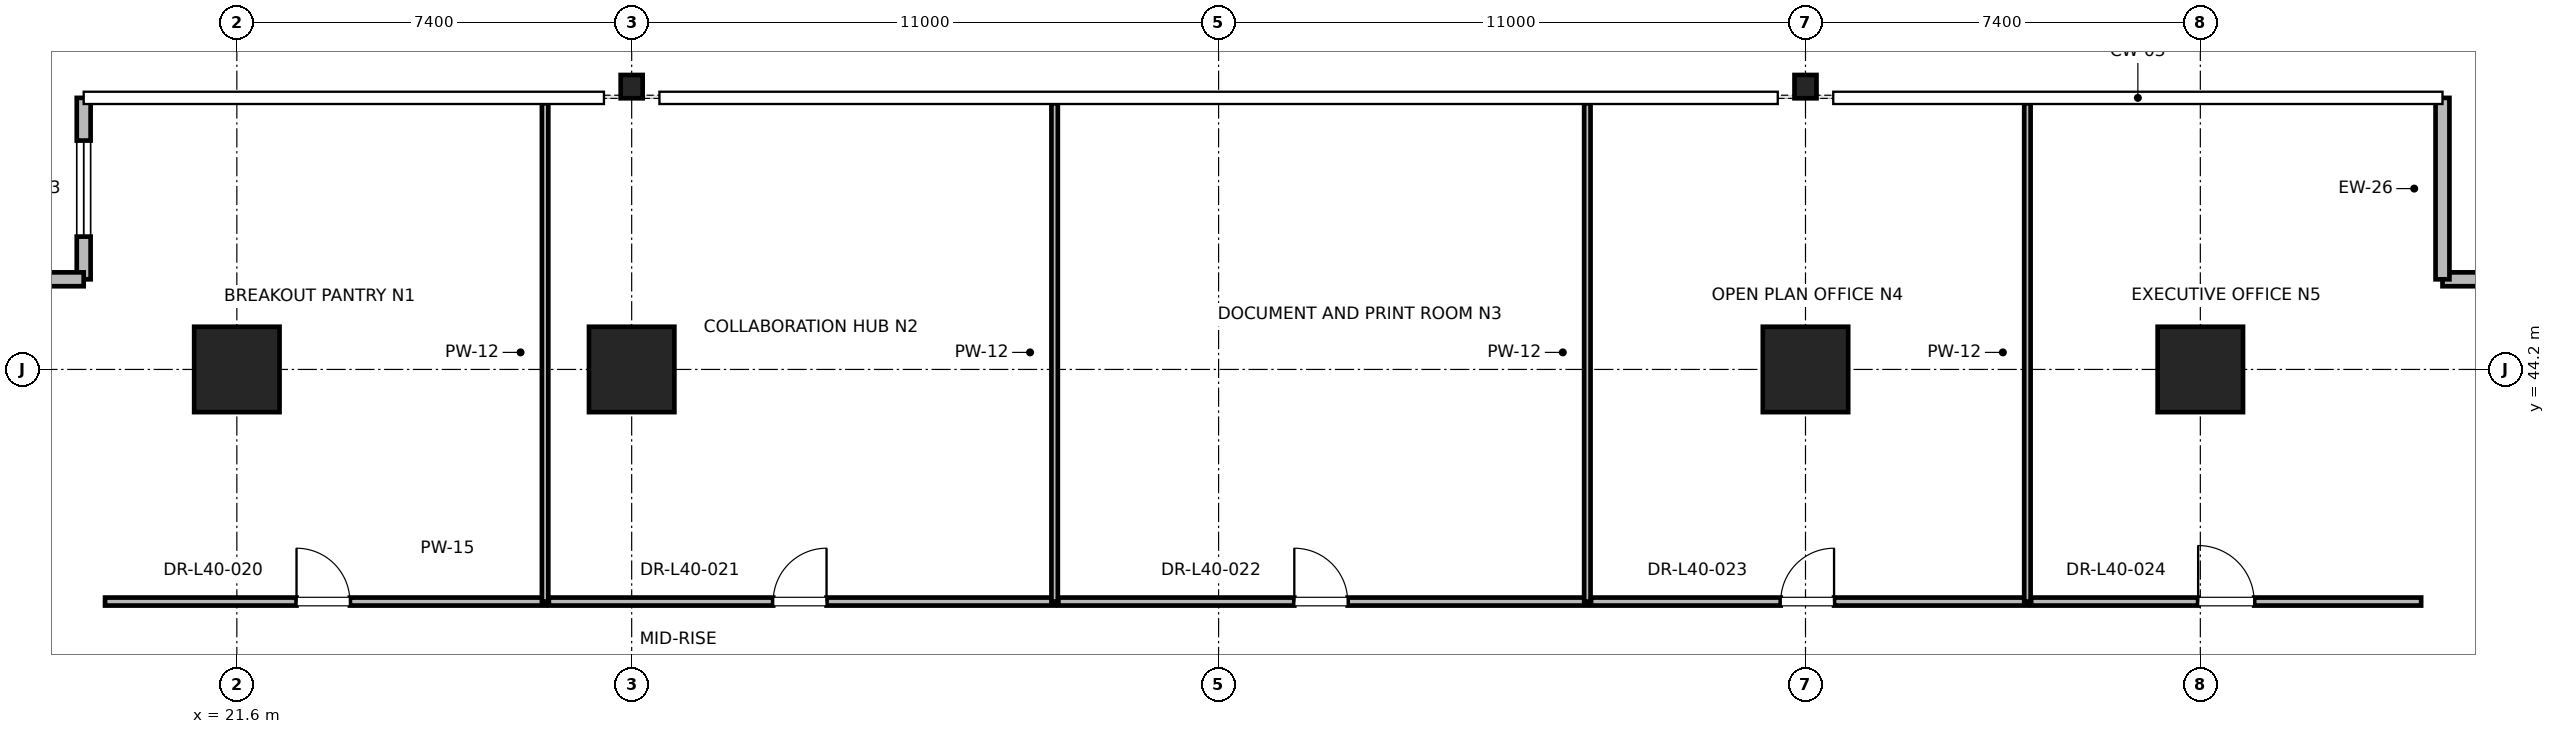
"""IFC4 building model, lengths in metres.
Left out: names, types, materials, properties, quantities, classifications, styles, units other than length and angle.
Written with IfcOpenShell. Run it as: python <this file> out.ifc"""

import sys

from ifc_helpers import new_model, si_unit, direction, frame, frame_2d, origin, origin_2d, place, context, subcontext, project, spatial, rectangle, i_section, extrude, element, fill, save


model = new_model("IFC4")
c1 = context("Model", 3, precision=1e-05, world=origin(), true_north=direction((0.0, 1.0)))
c2 = subcontext(c1, "Body", "Model", "MODEL_VIEW")
j1 = project(units=[si_unit("LENGTHUNIT", "METRE"), si_unit("PLANEANGLEUNIT", "RADIAN")], contexts=[c1])
p1 = place(None, origin())
s1 = spatial("IfcSite", under=j1, at=p1, CompositionType="ELEMENT")
p2 = place(p1, origin())
s2 = spatial("IfcBuilding", under=s1, at=p2, CompositionType="ELEMENT")
p3 = place(p2, frame((0.0, 0.0, 172.4)))
s3 = spatial("IfcBuildingStorey", under=s2, at=p3, CompositionType="ELEMENT", Elevation=172.4)
for number, where, z_axis, x_axis in (
    (1, (29.0, 44.2, 0.0), (0.0, 0.0, 1.0), (1.0, 0.0, 0.0)),
    (2, (51.0, 44.2, 0.0), (0.0, 0.0, 1.0), (1.0, 0.0, 0.0)),
    (3, (21.6, 44.2, 0.0), (0.0, 0.0, 1.0), (1.0, 0.0, 0.0)),
    (4, (58.4, 44.2, 0.0), (0.0, 0.0, 1.0), (1.0, 0.0, 0.0)),
):
    element("IfcColumn", number, at=place(p3, frame(where, z_axis=z_axis, x_axis=x_axis)), inside=s3, PredefinedType="COLUMN", context=c2, shape_type="SweptSolid", body=[
        extrude(rectangle(XDim=1.6, YDim=1.6, at=origin_2d()), origin(), (0.0, 0.0, 1.0), 4.0),
    ])
for number, where, z_axis, x_axis in (
    (5, (29.0, 49.5, 0.0), (0.0, 0.0, 1.0), (1.0, 0.0, 0.0)),
    (6, (51.0, 49.5, 0.0), (0.0, 0.0, 1.0), (1.0, 0.0, 0.0)),
):
    element("IfcColumn", number, at=place(p3, frame(where, z_axis=z_axis, x_axis=x_axis)), inside=s3, PredefinedType="COLUMN", context=c2, shape_type="SweptSolid", body=[
        extrude(i_section(OverallWidth=0.412, OverallDepth=0.437, WebThickness=0.036, FlangeThickness=0.058, FilletRadius=0.015, at=origin_2d()), origin(), (0.0, 0.0, 1.0), 4.0),
    ])
p4 = place(p3, frame((66.739, 45.889, 0.0), z_axis=(0.0, 0.0, 1.0), x_axis=(-1.0, 0.0, 0.0)))
e7 = element("IfcWall", 7, at=p4, inside=s3, PredefinedType="PARAPET", context=c2, shape_type="SweptSolid", body=[
    extrude(rectangle(XDim=3.8, YDim=0.26, at=frame_2d((1.9, 0.0))), origin(), (0.0, 0.0, 1.0), 3.775),
])
p5 = place(p4, frame((1.0, 0.0, 0.85)))
e8 = element("IfcOpeningElement", 8, at=p5, cuts=e7, PredefinedType="OPENING", context=c2, shape_type="SweptSolid", body=[
    extrude(rectangle(XDim=1.8, YDim=2.2, at=frame_2d((0.9, 1.1))), frame((0.0, 0.13, 0.0), z_axis=(0.0, -1.0, 0.0), x_axis=(1.0, 0.0, 0.0)), (0.0, 0.0, 1.0), 0.26),
])
p6 = place(p3, frame((62.939, 45.889, 0.0), z_axis=(0.0, 0.0, 1.0), x_axis=(0.0, 1.0, 0.0)))
e9 = element("IfcWall", 9, at=p6, inside=s3, PredefinedType="PARAPET", context=c2, shape_type="SweptSolid", body=[
    extrude(rectangle(XDim=3.4, YDim=0.26, at=frame_2d((1.7, 0.0))), origin(), (0.0, 0.0, 1.0), 3.775),
])
p7 = place(p3, frame((18.729, 49.289, 0.0), z_axis=(0.0, 0.0, 1.0), x_axis=(0.0, -1.0, 0.0)))
e10 = element("IfcWall", 10, at=p7, inside=s3, PredefinedType="PARAPET", context=c2, shape_type="SweptSolid", body=[
    extrude(rectangle(XDim=3.4, YDim=0.26, at=frame_2d((1.7, 0.0))), origin(), (0.0, 0.0, 1.0), 3.775),
])
p8 = place(p7, frame((0.8, 0.0, 0.85)))
e11 = element("IfcOpeningElement", 11, at=p8, cuts=e10, PredefinedType="OPENING", context=c2, shape_type="SweptSolid", body=[
    extrude(rectangle(XDim=1.8, YDim=2.2, at=frame_2d((0.9, 1.1))), frame((0.0, 0.13, 0.0), z_axis=(0.0, -1.0, 0.0), x_axis=(1.0, 0.0, 0.0)), (0.0, 0.0, 1.0), 0.26),
])
p9 = place(p3, frame((18.729, 45.889, 0.0), z_axis=(0.0, 0.0, 1.0), x_axis=(-1.0, 0.0, 0.0)))
e12 = element("IfcWall", 12, at=p9, inside=s3, PredefinedType="PARAPET", context=c2, shape_type="SweptSolid", body=[
    extrude(rectangle(XDim=3.8, YDim=0.26, at=frame_2d((1.9, 0.0))), origin(), (0.0, 0.0, 1.0), 3.775),
])
p10 = place(p3, frame((19.13, 39.85, 0.0), z_axis=(0.0, 0.0, 1.0), x_axis=(1.0, 0.0, 0.0)))
e13 = element("IfcWall", 13, at=p10, inside=s3, PredefinedType="PARTITIONING", context=c2, shape_type="SweptSolid", body=[
    extrude(rectangle(XDim=8.248, YDim=0.15, at=frame_2d((4.124, 0.0))), origin(), (0.0, 0.0, 1.0), 2.85),
])
p11 = place(p10, frame((3.589, 0.0, 0.0)))
e14 = element("IfcOpeningElement", 14, at=p11, cuts=e13, PredefinedType="OPENING", context=c2, shape_type="SweptSolid", body=[
    extrude(rectangle(XDim=1.0, YDim=2.15, at=frame_2d((0.5, 1.075))), frame((0.0, 0.075, 0.0), z_axis=(0.0, -1.0, 0.0), x_axis=(1.0, 0.0, 0.0)), (0.0, 0.0, 1.0), 0.15),
])
p12 = place(p3, frame((27.377, 39.85, 0.0), z_axis=(0.0, 0.0, 1.0), x_axis=(0.0, 1.0, 0.0)))
e15 = element("IfcWall", 15, at=p12, inside=s3, PredefinedType="PARTITIONING", context=c2, shape_type="SweptSolid", body=[
    extrude(rectangle(XDim=9.339, YDim=0.12, at=frame_2d((4.669, 0.0))), origin(), (0.0, 0.0, 1.0), 2.85),
])
p13 = place(p3, frame((27.447, 39.85, 0.0), z_axis=(0.0, 0.0, 1.0), x_axis=(1.0, 0.0, 0.0)))
e16 = element("IfcWall", 16, at=p13, inside=s3, PredefinedType="PARTITIONING", context=c2, shape_type="SweptSolid", body=[
    extrude(rectangle(XDim=9.48, YDim=0.15, at=frame_2d((4.74, 0.0))), origin(), (0.0, 0.0, 1.0), 2.85),
])
p14 = place(p13, frame((4.205, 0.0, 0.0)))
e17 = element("IfcOpeningElement", 17, at=p14, cuts=e16, PredefinedType="OPENING", context=c2, shape_type="SweptSolid", body=[
    extrude(rectangle(XDim=1.0, YDim=2.15, at=frame_2d((0.5, 1.075))), frame((0.0, 0.075, 0.0), z_axis=(0.0, -1.0, 0.0), x_axis=(1.0, 0.0, 0.0)), (0.0, 0.0, 1.0), 0.15),
])
p15 = place(p3, frame((36.927, 39.85, 0.0), z_axis=(0.0, 0.0, 1.0), x_axis=(0.0, 1.0, 0.0)))
e18 = element("IfcWall", 18, at=p15, inside=s3, PredefinedType="PARTITIONING", context=c2, shape_type="SweptSolid", body=[
    extrude(rectangle(XDim=9.339, YDim=0.12, at=frame_2d((4.669, 0.0))), origin(), (0.0, 0.0, 1.0), 2.405),
])
p16 = place(p3, frame((36.997, 39.85, 0.0), z_axis=(0.0, 0.0, 1.0), x_axis=(1.0, 0.0, 0.0)))
e19 = element("IfcWall", 19, at=p16, inside=s3, PredefinedType="PARTITIONING", context=c2, shape_type="SweptSolid", body=[
    extrude(rectangle(XDim=9.914, YDim=0.15, at=frame_2d((4.957, 0.0))), origin(), (0.0, 0.0, 1.0), 2.85),
])
p17 = place(p16, frame((4.422, 0.0, 0.0)))
e20 = element("IfcOpeningElement", 20, at=p17, cuts=e19, PredefinedType="OPENING", context=c2, shape_type="SweptSolid", body=[
    extrude(rectangle(XDim=1.0, YDim=2.15, at=frame_2d((0.5, 1.075))), frame((0.0, 0.075, 0.0), z_axis=(0.0, -1.0, 0.0), x_axis=(1.0, 0.0, 0.0)), (0.0, 0.0, 1.0), 0.15),
])
p18 = place(p3, frame((46.911, 39.85, 0.0), z_axis=(0.0, 0.0, 1.0), x_axis=(0.0, 1.0, 0.0)))
e21 = element("IfcWall", 21, at=p18, inside=s3, PredefinedType="PARTITIONING", context=c2, shape_type="SweptSolid", body=[
    extrude(rectangle(XDim=9.339, YDim=0.12, at=frame_2d((4.669, 0.0))), origin(), (0.0, 0.0, 1.0), 2.405),
])
p19 = place(p3, frame((46.981, 39.85, 0.0), z_axis=(0.0, 0.0, 1.0), x_axis=(1.0, 0.0, 0.0)))
e22 = element("IfcWall", 22, at=p19, inside=s3, PredefinedType="PARTITIONING", context=c2, shape_type="SweptSolid", body=[
    extrude(rectangle(XDim=8.178, YDim=0.15, at=frame_2d((4.089, 0.0))), origin(), (0.0, 0.0, 1.0), 2.85),
])
p20 = place(p19, frame((3.554, 0.0, 0.0)))
e23 = element("IfcOpeningElement", 23, at=p20, cuts=e22, PredefinedType="OPENING", context=c2, shape_type="SweptSolid", body=[
    extrude(rectangle(XDim=1.0, YDim=2.15, at=frame_2d((0.5, 1.075))), frame((0.0, 0.075, 0.0), z_axis=(0.0, -1.0, 0.0), x_axis=(1.0, 0.0, 0.0)), (0.0, 0.0, 1.0), 0.15),
])
p21 = place(p3, frame((55.159, 39.85, 0.0), z_axis=(0.0, 0.0, 1.0), x_axis=(0.0, 1.0, 0.0)))
e24 = element("IfcWall", 24, at=p21, inside=s3, PredefinedType="PARTITIONING", context=c2, shape_type="SweptSolid", body=[
    extrude(rectangle(XDim=9.339, YDim=0.12, at=frame_2d((4.669, 0.0))), origin(), (0.0, 0.0, 1.0), 2.85),
])
p22 = place(p3, frame((55.229, 39.85, 0.0), z_axis=(0.0, 0.0, 1.0), x_axis=(1.0, 0.0, 0.0)))
e25 = element("IfcWall", 25, at=p22, inside=s3, PredefinedType="PARTITIONING", context=c2, shape_type="SweptSolid", body=[
    extrude(rectangle(XDim=7.31, YDim=0.15, at=frame_2d((3.655, 0.0))), origin(), (0.0, 0.0, 1.0), 2.85),
])
p23 = place(p22, frame((3.13, 0.0, 0.0)))
e26 = element("IfcOpeningElement", 26, at=p23, cuts=e25, PredefinedType="OPENING", context=c2, shape_type="SweptSolid", body=[
    extrude(rectangle(XDim=1.05, YDim=2.2, at=frame_2d((0.525, 1.1))), frame((0.0, 0.075, 0.0), z_axis=(0.0, -1.0, 0.0), x_axis=(1.0, 0.0, 0.0)), (0.0, 0.0, 1.0), 0.15),
])
p24 = place(p8, origin())
e27 = element("IfcWindow", 27, at=p24, inside=s3, PartitioningType="SINGLE_PANEL", PredefinedType="WINDOW", context=c2, shape_type="SweptSolid", body=[
    extrude(rectangle(XDim=1.8, YDim=2.2, at=frame_2d((0.9, 1.1))), frame((0.0, 0.03, 0.0), z_axis=(0.0, -1.0, 0.0), x_axis=(1.0, 0.0, 0.0)), (0.0, 0.0, 1.0), 0.06),
])
fill(e11, e27)
p25 = place(p11, origin())
e28 = element("IfcDoor", 28, at=p25, inside=s3, OperationType="SINGLE_SWING_LEFT", PredefinedType="DOOR", context=c2, shape_type="SweptSolid", body=[
    extrude(rectangle(XDim=1.0, YDim=2.15, at=frame_2d((0.5, 1.075))), frame((0.0, 0.025, 0.0), z_axis=(0.0, -1.0, 0.0), x_axis=(1.0, 0.0, 0.0)), (0.0, 0.0, 1.0), 0.05),
])
fill(e14, e28)
p26 = place(p14, origin())
e29 = element("IfcDoor", 29, at=p26, inside=s3, OperationType="SINGLE_SWING_RIGHT", PredefinedType="DOOR", context=c2, shape_type="SweptSolid", body=[
    extrude(rectangle(XDim=1.0, YDim=2.15, at=frame_2d((0.5, 1.075))), frame((0.0, 0.025, 0.0), z_axis=(0.0, -1.0, 0.0), x_axis=(1.0, 0.0, 0.0)), (0.0, 0.0, 1.0), 0.05),
])
fill(e17, e29)
p27 = place(p17, origin())
e30 = element("IfcDoor", 30, at=p27, inside=s3, OperationType="SINGLE_SWING_LEFT", PredefinedType="DOOR", context=c2, shape_type="SweptSolid", body=[
    extrude(rectangle(XDim=1.0, YDim=2.15, at=frame_2d((0.5, 1.075))), frame((0.0, 0.025, 0.0), z_axis=(0.0, -1.0, 0.0), x_axis=(1.0, 0.0, 0.0)), (0.0, 0.0, 1.0), 0.05),
])
fill(e20, e30)
p28 = place(p20, origin())
e31 = element("IfcDoor", 31, at=p28, inside=s3, OperationType="SINGLE_SWING_RIGHT", PredefinedType="DOOR", context=c2, shape_type="SweptSolid", body=[
    extrude(rectangle(XDim=1.0, YDim=2.15, at=frame_2d((0.5, 1.075))), frame((0.0, 0.025, 0.0), z_axis=(0.0, -1.0, 0.0), x_axis=(1.0, 0.0, 0.0)), (0.0, 0.0, 1.0), 0.05),
])
fill(e23, e31)
p29 = place(p23, origin())
e32 = element("IfcDoor", 32, at=p29, inside=s3, OperationType="SINGLE_SWING_LEFT", PredefinedType="DOOR", context=c2, shape_type="SweptSolid", body=[
    extrude(rectangle(XDim=1.05, YDim=2.2, at=frame_2d((0.525, 1.1))), frame((0.0, 0.025, 0.0), z_axis=(0.0, -1.0, 0.0), x_axis=(1.0, 0.0, 0.0)), (0.0, 0.0, 1.0), 0.05),
])
fill(e26, e32)
save(model, sys.argv[1])
